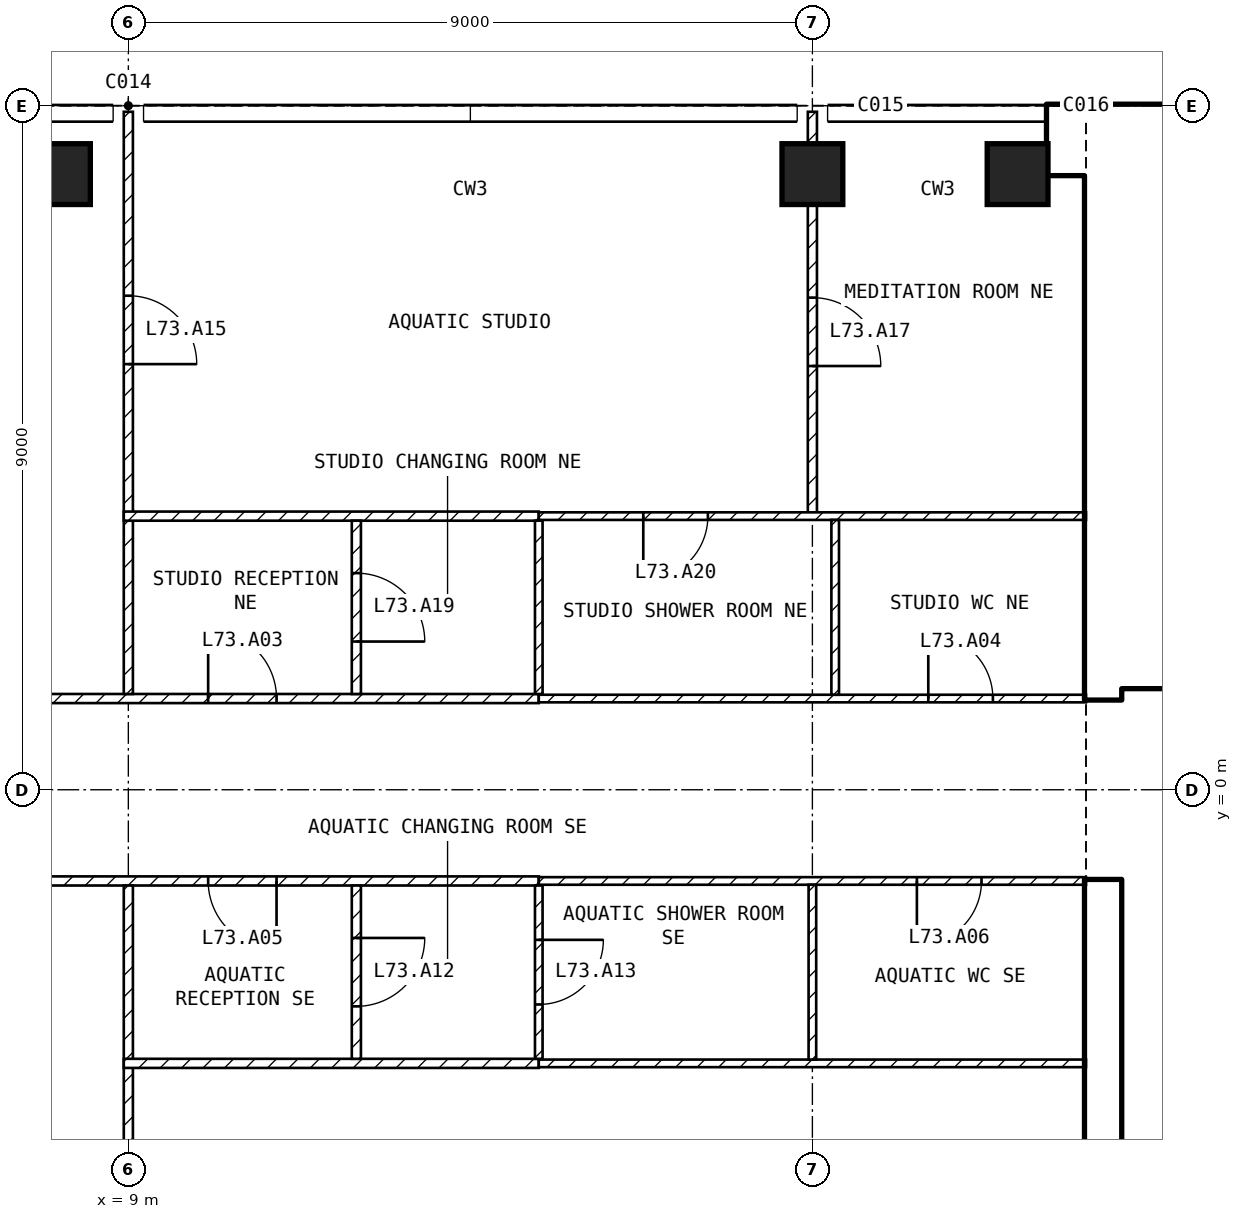
"""IFC4 building model, lengths in metres.
Left out: names, types, materials, properties, quantities, classifications, styles, units other than length and angle.
Written with IfcOpenShell. Run it as: python <this file> out.ifc"""

import sys

from ifc_helpers import new_model, si_unit, direction, frame, frame_2d, origin, origin_2d, place, context, subcontext, project, spatial, rectangle, extrude, element, fill, save


model = new_model("IFC4")
c1 = context("Model", 3, precision=1e-05, world=origin(), true_north=direction((0.0, 1.0)))
c2 = subcontext(c1, "Body", "Model", "MODEL_VIEW")
j1 = project(units=[si_unit("LENGTHUNIT", "METRE"), si_unit("PLANEANGLEUNIT", "RADIAN")], contexts=[c1])
p1 = place(None, origin())
s1 = spatial("IfcSite", under=j1, at=p1, CompositionType="ELEMENT")
p2 = place(p1, origin())
s2 = spatial("IfcBuilding", under=s1, at=p2, CompositionType="ELEMENT")
p3 = place(p2, frame((0.0, 0.0, 285.0)))
s3 = spatial("IfcBuildingStorey", under=s2, at=p3, CompositionType="ELEMENT", Elevation=285.0)
for number, where, z_axis, x_axis in (
    (1, (8.1, 8.1, -0.3), (0.0, 0.0, 1.0), (1.0, 0.0, 0.0)),
    (2, (18.0, 8.1, -0.3), (0.0, 0.0, 1.0), (1.0, 0.0, 0.0)),
    (3, (20.7, 8.1, -0.3), (0.0, 0.0, 1.0), (1.0, 0.0, 0.0)),
):
    element("IfcColumn", number, at=place(p3, frame(where, z_axis=z_axis, x_axis=x_axis)), inside=s3, PredefinedType="COLUMN", context=c2, shape_type="SweptSolid", body=[
        extrude(rectangle(XDim=0.8, YDim=0.8, at=origin_2d()), origin(), (0.0, 0.0, 1.0), 5.45),
    ])
p4 = place(p3, frame((21.1, 8.55, 0.0), z_axis=(0.0, 0.0, 1.0), x_axis=(1.0, 0.0, 0.0)))
e4 = element("IfcWall", 4, at=p4, inside=s3, PredefinedType="SHEAR", context=c2, shape_type="SweptSolid", body=[
    extrude(rectangle(XDim=8.65, YDim=0.9, at=frame_2d((4.325, 0.0))), origin(), (0.0, 0.0, 1.0), 5.15),
])
for number, where, z_axis, x_axis in (
    (5, (21.825, -8.1, 0.0), (0.0, 0.0, 1.0), (0.0, 1.0, 0.0)),
    (6, (21.825, 1.2, 0.0), (0.0, 0.0, 1.0), (0.0, 1.0, 0.0)),
):
    element("IfcWall", number, at=place(p3, frame(where, z_axis=z_axis, x_axis=x_axis)), inside=s3, PredefinedType="SHEAR", context=c2, shape_type="SweptSolid", body=[
        extrude(rectangle(XDim=6.9, YDim=0.45, at=frame_2d((3.45, 0.0))), origin(), (0.0, 0.0, 1.0), 5.15),
    ])
p5 = place(p3, frame((22.05, 1.45, 0.0), z_axis=(0.0, 0.0, 1.0), x_axis=(1.0, 0.0, 0.0)))
e7 = element("IfcWall", 7, at=p5, inside=s3, PredefinedType="SOLIDWALL", context=c2, shape_type="SweptSolid", body=[
    extrude(rectangle(XDim=11.3, YDim=0.2, at=frame_2d((5.65, 0.0))), origin(), (0.0, 0.0, 1.0), 5.15),
])
p6 = place(p5, frame((0.75, 0.0, 0.0)))
e8 = element("IfcOpeningElement", 8, at=p6, cuts=e7, PredefinedType="OPENING", context=c2, shape_type="SweptSolid", body=[
    extrude(rectangle(XDim=1.0, YDim=2.1, at=frame_2d((0.5, 1.05))), frame((0.0, 0.11, 0.0), z_axis=(0.0, -1.0, 0.0), x_axis=(1.0, 0.0, 0.0)), (0.0, 0.0, 1.0), 0.22),
])
p7 = place(p5, frame((3.25, 0.0, 0.0)))
e9 = element("IfcOpeningElement", 9, at=p7, cuts=e7, PredefinedType="OPENING", context=c2, shape_type="SweptSolid", body=[
    extrude(rectangle(XDim=1.0, YDim=2.1, at=frame_2d((0.5, 1.05))), frame((0.0, 0.11, 0.0), z_axis=(0.0, -1.0, 0.0), x_axis=(1.0, 0.0, 0.0)), (0.0, 0.0, 1.0), 0.22),
])
p8 = place(p5, frame((9.225, 0.0, 0.0)))
e10 = element("IfcOpeningElement", 10, at=p8, cuts=e7, PredefinedType="OPENING", context=c2, shape_type="SweptSolid", body=[
    extrude(rectangle(XDim=0.9, YDim=2.1, at=frame_2d((0.45, 1.05))), frame((0.0, 0.11, 0.0), z_axis=(0.0, -1.0, 0.0), x_axis=(1.0, 0.0, 0.0)), (0.0, 0.0, 1.0), 0.22),
])
p9 = place(p3, frame((22.05, 5.15, 0.0), z_axis=(0.0, 0.0, 1.0), x_axis=(1.0, 0.0, 0.0)))
e11 = element("IfcWall", 11, at=p9, inside=s3, PredefinedType="SOLIDWALL", context=c2, shape_type="SweptSolid", body=[
    extrude(rectangle(XDim=6.3, YDim=0.2, at=frame_2d((3.15, 0.0))), origin(), (0.0, 0.0, 1.0), 5.15),
])
p10 = place(p9, frame((0.2, 0.0, 0.0)))
e12 = element("IfcOpeningElement", 12, at=p10, cuts=e11, PredefinedType="OPENING", context=c2, shape_type="SweptSolid", body=[
    extrude(rectangle(XDim=1.0, YDim=2.1, at=frame_2d((0.5, 1.05))), frame((0.0, 0.11, 0.0), z_axis=(0.0, -1.0, 0.0), x_axis=(1.0, 0.0, 0.0)), (0.0, 0.0, 1.0), 0.22),
])
p11 = place(p3, frame((-18.3, 1.2, 0.0), z_axis=(0.0, 0.0, 1.0), x_axis=(1.0, 0.0, 0.0)))
e13 = element("IfcWall", 13, at=p11, inside=s3, PredefinedType="PARTITIONING", context=c2, shape_type="SweptSolid", body=[
    extrude(rectangle(XDim=32.7, YDim=0.12, at=frame_2d((16.35, 0.0))), origin(), (0.0, 0.0, 1.0), 5.15),
])
p12 = place(p11, frame((17.4, 0.0, 0.0)))
e14 = element("IfcOpeningElement", 14, at=p12, cuts=e13, PredefinedType="OPENING", context=c2, shape_type="SweptSolid", body=[
    extrude(rectangle(XDim=1.8, YDim=2.1, at=frame_2d((0.9, 1.05))), frame((0.0, 0.07, 0.0), z_axis=(0.0, -1.0, 0.0), x_axis=(1.0, 0.0, 0.0)), (0.0, 0.0, 1.0), 0.14),
])
p13 = place(p11, frame((28.35, 0.0, 0.0)))
e15 = element("IfcOpeningElement", 15, at=p13, cuts=e13, PredefinedType="OPENING", context=c2, shape_type="SweptSolid", body=[
    extrude(rectangle(XDim=0.9, YDim=2.1, at=frame_2d((0.45, 1.05))), frame((0.0, 0.07, 0.0), z_axis=(0.0, -1.0, 0.0), x_axis=(1.0, 0.0, 0.0)), (0.0, 0.0, 1.0), 0.14),
])
p14 = place(p11, frame((6.9, 0.0, 0.0)))
e16 = element("IfcOpeningElement", 16, at=p14, cuts=e13, PredefinedType="OPENING", context=c2, shape_type="SweptSolid", body=[
    extrude(rectangle(XDim=0.9, YDim=2.1, at=frame_2d((0.45, 1.05))), frame((0.0, 0.07, 0.0), z_axis=(0.0, -1.0, 0.0), x_axis=(1.0, 0.0, 0.0)), (0.0, 0.0, 1.0), 0.14),
])
p15 = place(p3, frame((14.4, -1.2, 0.0), z_axis=(0.0, 0.0, 1.0), x_axis=(-1.0, 0.0, 0.0)))
e17 = element("IfcWall", 17, at=p15, inside=s3, PredefinedType="PARTITIONING", context=c2, shape_type="SweptSolid", body=[
    extrude(rectangle(XDim=32.4, YDim=0.12, at=frame_2d((16.2, 0.0))), origin(), (0.0, 0.0, 1.0), 5.15),
])
p16 = place(p15, frame((13.5, 0.0, 0.0)))
e18 = element("IfcOpeningElement", 18, at=p16, cuts=e17, PredefinedType="OPENING", context=c2, shape_type="SweptSolid", body=[
    extrude(rectangle(XDim=1.8, YDim=2.1, at=frame_2d((0.9, 1.05))), frame((0.0, 0.07, 0.0), z_axis=(0.0, -1.0, 0.0), x_axis=(1.0, 0.0, 0.0)), (0.0, 0.0, 1.0), 0.14),
])
p17 = place(p15, frame((3.45, 0.0, 0.0)))
e19 = element("IfcOpeningElement", 19, at=p17, cuts=e17, PredefinedType="OPENING", context=c2, shape_type="SweptSolid", body=[
    extrude(rectangle(XDim=0.9, YDim=2.1, at=frame_2d((0.45, 1.05))), frame((0.0, 0.07, 0.0), z_axis=(0.0, -1.0, 0.0), x_axis=(1.0, 0.0, 0.0)), (0.0, 0.0, 1.0), 0.14),
])
p18 = place(p15, frame((30.15, 0.0, 0.0)))
e20 = element("IfcOpeningElement", 20, at=p18, cuts=e17, PredefinedType="OPENING", context=c2, shape_type="SweptSolid", body=[
    extrude(rectangle(XDim=0.9, YDim=2.1, at=frame_2d((0.45, 1.05))), frame((0.0, 0.07, 0.0), z_axis=(0.0, -1.0, 0.0), x_axis=(1.0, 0.0, 0.0)), (0.0, 0.0, 1.0), 0.14),
])
p19 = place(p3, frame((14.4, 1.2, 0.0), z_axis=(0.0, 0.0, 1.0), x_axis=(1.0, 0.0, 0.0)))
e21 = element("IfcWall", 21, at=p19, inside=s3, PredefinedType="PARTITIONING", context=c2, shape_type="SweptSolid", body=[
    extrude(rectangle(XDim=7.2, YDim=0.1, at=frame_2d((3.6, 0.0))), origin(), (0.0, 0.0, 1.0), 5.15),
])
p20 = place(p19, frame((5.125, 0.0, 0.0)))
e22 = element("IfcOpeningElement", 22, at=p20, cuts=e21, PredefinedType="OPENING", context=c2, shape_type="SweptSolid", body=[
    extrude(rectangle(XDim=0.85, YDim=2.1, at=frame_2d((0.425, 1.05))), frame((0.0, 0.06, 0.0), z_axis=(0.0, -1.0, 0.0), x_axis=(1.0, 0.0, 0.0)), (0.0, 0.0, 1.0), 0.12),
])
p21 = place(p3, frame((21.6, -1.2, 0.0), z_axis=(0.0, 0.0, 1.0), x_axis=(-1.0, 0.0, 0.0)))
e23 = element("IfcWall", 23, at=p21, inside=s3, PredefinedType="PARTITIONING", context=c2, shape_type="SweptSolid", body=[
    extrude(rectangle(XDim=7.2, YDim=0.1, at=frame_2d((3.6, 0.0))), origin(), (0.0, 0.0, 1.0), 5.15),
])
p22 = place(p21, frame((1.375, 0.0, 0.0)))
e24 = element("IfcOpeningElement", 24, at=p22, cuts=e23, PredefinedType="OPENING", context=c2, shape_type="SweptSolid", body=[
    extrude(rectangle(XDim=0.85, YDim=2.1, at=frame_2d((0.425, 1.05))), frame((0.0, 0.06, 0.0), z_axis=(0.0, -1.0, 0.0), x_axis=(1.0, 0.0, 0.0)), (0.0, 0.0, 1.0), 0.12),
])
p23 = place(p3, frame((9.0, 8.92, 0.0), z_axis=(0.0, 0.0, 1.0), x_axis=(0.0, -1.0, 0.0)))
e25 = element("IfcWall", 25, at=p23, inside=s3, PredefinedType="PARTITIONING", context=c2, shape_type="SweptSolid", body=[
    extrude(rectangle(XDim=7.66, YDim=0.12, at=frame_2d((3.83, 0.0))), origin(), (0.0, 0.0, 1.0), 5.15),
])
p24 = place(p23, frame((2.42, 0.0, 0.0)))
e26 = element("IfcOpeningElement", 26, at=p24, cuts=e25, PredefinedType="OPENING", context=c2, shape_type="SweptSolid", body=[
    extrude(rectangle(XDim=0.9, YDim=2.1, at=frame_2d((0.45, 1.05))), frame((0.0, 0.07, 0.0), z_axis=(0.0, -1.0, 0.0), x_axis=(1.0, 0.0, 0.0)), (0.0, 0.0, 1.0), 0.14),
])
p25 = place(p3, frame((9.0, -1.26, 0.0), z_axis=(0.0, 0.0, 1.0), x_axis=(0.0, -1.0, 0.0)))
e27 = element("IfcWall", 27, at=p25, inside=s3, PredefinedType="PARTITIONING", context=c2, shape_type="SweptSolid", body=[
    extrude(rectangle(XDim=7.66, YDim=0.12, at=frame_2d((3.83, 0.0))), origin(), (0.0, 0.0, 1.0), 5.15),
])
p26 = place(p25, frame((4.44, 0.0, 0.0)))
e28 = element("IfcOpeningElement", 28, at=p26, cuts=e27, PredefinedType="OPENING", context=c2, shape_type="SweptSolid", body=[
    extrude(rectangle(XDim=0.9, YDim=2.1, at=frame_2d((0.45, 1.05))), frame((0.0, 0.07, 0.0), z_axis=(0.0, -1.0, 0.0), x_axis=(1.0, 0.0, 0.0)), (0.0, 0.0, 1.0), 0.14),
])
p27 = place(p3, frame((18.0, 8.92, 0.0), z_axis=(0.0, 0.0, 1.0), x_axis=(0.0, -1.0, 0.0)))
e29 = element("IfcWall", 29, at=p27, inside=s3, PredefinedType="PARTITIONING", context=c2, shape_type="SweptSolid", body=[
    extrude(rectangle(XDim=5.27, YDim=0.12, at=frame_2d((2.635, 0.0))), origin(), (0.0, 0.0, 1.0), 4.396),
])
p28 = place(p27, frame((2.445, 0.0, 0.0)))
e30 = element("IfcOpeningElement", 30, at=p28, cuts=e29, PredefinedType="OPENING", context=c2, shape_type="SweptSolid", body=[
    extrude(rectangle(XDim=0.9, YDim=2.1, at=frame_2d((0.45, 1.05))), frame((0.0, 0.07, 0.0), z_axis=(0.0, -1.0, 0.0), x_axis=(1.0, 0.0, 0.0)), (0.0, 0.0, 1.0), 0.14),
])
p29 = place(p3, frame((14.4, 3.6, 0.0), z_axis=(0.0, 0.0, 1.0), x_axis=(-1.0, 0.0, 0.0)))
e31 = element("IfcWall", 31, at=p29, inside=s3, PredefinedType="PARTITIONING", context=c2, shape_type="SweptSolid", body=[
    extrude(rectangle(XDim=5.46, YDim=0.12, at=frame_2d((2.73, 0.0))), origin(), (0.0, 0.0, 1.0), 5.15),
])
p30 = place(p3, frame((21.6, 3.6, 0.0), z_axis=(0.0, 0.0, 1.0), x_axis=(-1.0, 0.0, 0.0)))
e32 = element("IfcWall", 32, at=p30, inside=s3, PredefinedType="PARTITIONING", context=c2, shape_type="SweptSolid", body=[
    extrude(rectangle(XDim=7.2, YDim=0.1, at=frame_2d((3.6, 0.0))), origin(), (0.0, 0.0, 1.0), 5.15),
])
p31 = place(p30, frame((4.975, 0.0, 0.0)))
e33 = element("IfcOpeningElement", 33, at=p31, cuts=e32, PredefinedType="OPENING", context=c2, shape_type="SweptSolid", body=[
    extrude(rectangle(XDim=0.85, YDim=2.1, at=frame_2d((0.425, 1.05))), frame((0.0, 0.06, 0.0), z_axis=(0.0, -1.0, 0.0), x_axis=(1.0, 0.0, 0.0)), (0.0, 0.0, 1.0), 0.12),
])
p32 = place(p3, frame((12.0, 3.54, 0.0), z_axis=(0.0, 0.0, 1.0), x_axis=(0.0, -1.0, 0.0)))
e34 = element("IfcWall", 34, at=p32, inside=s3, PredefinedType="PARTITIONING", context=c2, shape_type="SweptSolid", body=[
    extrude(rectangle(XDim=2.28, YDim=0.12, at=frame_2d((1.14, 0.0))), origin(), (0.0, 0.0, 1.0), 5.15),
])
p33 = place(p32, frame((0.69, 0.0, 0.0)))
e35 = element("IfcOpeningElement", 35, at=p33, cuts=e34, PredefinedType="OPENING", context=c2, shape_type="SweptSolid", body=[
    extrude(rectangle(XDim=0.9, YDim=2.1, at=frame_2d((0.45, 1.05))), frame((0.0, 0.07, 0.0), z_axis=(0.0, -1.0, 0.0), x_axis=(1.0, 0.0, 0.0)), (0.0, 0.0, 1.0), 0.14),
])
p34 = place(p3, frame((14.4, 3.54, 0.0), z_axis=(0.0, 0.0, 1.0), x_axis=(0.0, -1.0, 0.0)))
e36 = element("IfcWall", 36, at=p34, inside=s3, PredefinedType="PARTITIONING", context=c2, shape_type="SweptSolid", body=[
    extrude(rectangle(XDim=2.28, YDim=0.1, at=frame_2d((1.14, 0.0))), origin(), (0.0, 0.0, 1.0), 5.15),
])
p35 = place(p3, frame((18.3, 3.55, 0.0), z_axis=(0.0, 0.0, 1.0), x_axis=(0.0, -1.0, 0.0)))
e37 = element("IfcWall", 37, at=p35, inside=s3, PredefinedType="PARTITIONING", context=c2, shape_type="SweptSolid", body=[
    extrude(rectangle(XDim=2.3, YDim=0.1, at=frame_2d((1.15, 0.0))), origin(), (0.0, 0.0, 1.0), 5.15),
])
p36 = place(p3, frame((8.94, -3.6, 0.0), z_axis=(0.0, 0.0, 1.0), x_axis=(1.0, 0.0, 0.0)))
e38 = element("IfcWall", 38, at=p36, inside=s3, PredefinedType="PARTITIONING", context=c2, shape_type="SweptSolid", body=[
    extrude(rectangle(XDim=5.46, YDim=0.12, at=frame_2d((2.73, 0.0))), origin(), (0.0, 0.0, 1.0), 5.15),
])
p37 = place(p3, frame((14.4, -3.6, 0.0), z_axis=(0.0, 0.0, 1.0), x_axis=(1.0, 0.0, 0.0)))
e39 = element("IfcWall", 39, at=p37, inside=s3, PredefinedType="PARTITIONING", context=c2, shape_type="SweptSolid", body=[
    extrude(rectangle(XDim=7.2, YDim=0.1, at=frame_2d((3.6, 0.0))), origin(), (0.0, 0.0, 1.0), 5.15),
])
p38 = place(p3, frame((12.0, -1.26, 0.0), z_axis=(0.0, 0.0, 1.0), x_axis=(0.0, -1.0, 0.0)))
e40 = element("IfcWall", 40, at=p38, inside=s3, PredefinedType="PARTITIONING", context=c2, shape_type="SweptSolid", body=[
    extrude(rectangle(XDim=2.28, YDim=0.12, at=frame_2d((1.14, 0.0))), origin(), (0.0, 0.0, 1.0), 5.15),
])
p39 = place(p38, frame((0.69, 0.0, 0.0)))
e41 = element("IfcOpeningElement", 41, at=p39, cuts=e40, PredefinedType="OPENING", context=c2, shape_type="SweptSolid", body=[
    extrude(rectangle(XDim=0.9, YDim=2.1, at=frame_2d((0.45, 1.05))), frame((0.0, 0.07, 0.0), z_axis=(0.0, -1.0, 0.0), x_axis=(1.0, 0.0, 0.0)), (0.0, 0.0, 1.0), 0.14),
])
p40 = place(p3, frame((14.4, -1.26, 0.0), z_axis=(0.0, 0.0, 1.0), x_axis=(0.0, -1.0, 0.0)))
e42 = element("IfcWall", 42, at=p40, inside=s3, PredefinedType="PARTITIONING", context=c2, shape_type="SweptSolid", body=[
    extrude(rectangle(XDim=2.28, YDim=0.1, at=frame_2d((1.14, 0.0))), origin(), (0.0, 0.0, 1.0), 5.15),
])
p41 = place(p40, frame((0.715, 0.0, 0.0)))
e43 = element("IfcOpeningElement", 43, at=p41, cuts=e42, PredefinedType="OPENING", context=c2, shape_type="SweptSolid", body=[
    extrude(rectangle(XDim=0.85, YDim=2.1, at=frame_2d((0.425, 1.05))), frame((0.0, 0.06, 0.0), z_axis=(0.0, -1.0, 0.0), x_axis=(1.0, 0.0, 0.0)), (0.0, 0.0, 1.0), 0.12),
])
p42 = place(p3, frame((18.0, -1.25, 0.0), z_axis=(0.0, 0.0, 1.0), x_axis=(0.0, -1.0, 0.0)))
e44 = element("IfcWall", 44, at=p42, inside=s3, PredefinedType="PARTITIONING", context=c2, shape_type="SweptSolid", body=[
    extrude(rectangle(XDim=2.3, YDim=0.1, at=frame_2d((1.15, 0.0))), origin(), (0.0, 0.0, 1.0), 4.396),
])
p43 = place(p10, origin())
e45 = element("IfcDoor", 45, at=p43, inside=s3, OperationType="SINGLE_SWING_LEFT", PredefinedType="DOOR", context=c2, shape_type="SweptSolid", body=[
    extrude(rectangle(XDim=1.0, YDim=2.1, at=frame_2d((0.5, 1.05))), frame((0.0, 0.025, 0.0), z_axis=(0.0, -1.0, 0.0), x_axis=(1.0, 0.0, 0.0)), (0.0, 0.0, 1.0), 0.05),
])
fill(e12, e45)
p44 = place(p13, origin())
e46 = element("IfcDoor", 46, at=p44, inside=s3, OperationType="SINGLE_SWING_LEFT", PredefinedType="DOOR", context=c2, shape_type="SweptSolid", body=[
    extrude(rectangle(XDim=0.9, YDim=2.1, at=frame_2d((0.45, 1.05))), frame((0.0, 0.025, 0.0), z_axis=(0.0, -1.0, 0.0), x_axis=(1.0, 0.0, 0.0)), (0.0, 0.0, 1.0), 0.05),
])
fill(e15, e46)
p45 = place(p20, origin())
e47 = element("IfcDoor", 47, at=p45, inside=s3, OperationType="SINGLE_SWING_LEFT", PredefinedType="DOOR", context=c2, shape_type="SweptSolid", body=[
    extrude(rectangle(XDim=0.85, YDim=2.1, at=frame_2d((0.425, 1.05))), frame((0.0, 0.025, 0.0), z_axis=(0.0, -1.0, 0.0), x_axis=(1.0, 0.0, 0.0)), (0.0, 0.0, 1.0), 0.05),
])
fill(e22, e47)
p46 = place(p17, origin())
e48 = element("IfcDoor", 48, at=p46, inside=s3, OperationType="SINGLE_SWING_LEFT", PredefinedType="DOOR", context=c2, shape_type="SweptSolid", body=[
    extrude(rectangle(XDim=0.9, YDim=2.1, at=frame_2d((0.45, 1.05))), frame((0.0, 0.025, 0.0), z_axis=(0.0, -1.0, 0.0), x_axis=(1.0, 0.0, 0.0)), (0.0, 0.0, 1.0), 0.05),
])
fill(e19, e48)
p47 = place(p22, origin())
e49 = element("IfcDoor", 49, at=p47, inside=s3, OperationType="SINGLE_SWING_RIGHT", PredefinedType="DOOR", context=c2, shape_type="SweptSolid", body=[
    extrude(rectangle(XDim=0.85, YDim=2.1, at=frame_2d((0.425, 1.05))), frame((0.0, 0.025, 0.0), z_axis=(0.0, -1.0, 0.0), x_axis=(1.0, 0.0, 0.0)), (0.0, 0.0, 1.0), 0.05),
])
fill(e24, e49)
p48 = place(p39, origin())
e50 = element("IfcDoor", 50, at=p48, inside=s3, OperationType="SINGLE_SWING_LEFT", PredefinedType="DOOR", context=c2, shape_type="SweptSolid", body=[
    extrude(rectangle(XDim=0.9, YDim=2.1, at=frame_2d((0.45, 1.05))), frame((0.0, 0.025, 0.0), z_axis=(0.0, -1.0, 0.0), x_axis=(1.0, 0.0, 0.0)), (0.0, 0.0, 1.0), 0.05),
])
fill(e41, e50)
p49 = place(p41, origin())
e51 = element("IfcDoor", 51, at=p49, inside=s3, OperationType="SINGLE_SWING_LEFT", PredefinedType="DOOR", context=c2, shape_type="SweptSolid", body=[
    extrude(rectangle(XDim=0.85, YDim=2.1, at=frame_2d((0.425, 1.05))), frame((0.0, 0.025, 0.0), z_axis=(0.0, -1.0, 0.0), x_axis=(1.0, 0.0, 0.0)), (0.0, 0.0, 1.0), 0.05),
])
fill(e43, e51)
p50 = place(p24, origin())
e52 = element("IfcDoor", 52, at=p50, inside=s3, OperationType="SINGLE_SWING_RIGHT", PredefinedType="DOOR", context=c2, shape_type="SweptSolid", body=[
    extrude(rectangle(XDim=0.9, YDim=2.1, at=frame_2d((0.45, 1.05))), frame((0.0, 0.025, 0.0), z_axis=(0.0, -1.0, 0.0), x_axis=(1.0, 0.0, 0.0)), (0.0, 0.0, 1.0), 0.05),
])
fill(e26, e52)
p51 = place(p28, origin())
e53 = element("IfcDoor", 53, at=p51, inside=s3, OperationType="SINGLE_SWING_RIGHT", PredefinedType="DOOR", context=c2, shape_type="SweptSolid", body=[
    extrude(rectangle(XDim=0.9, YDim=2.1, at=frame_2d((0.45, 1.05))), frame((0.0, 0.025, 0.0), z_axis=(0.0, -1.0, 0.0), x_axis=(1.0, 0.0, 0.0)), (0.0, 0.0, 1.0), 0.05),
])
fill(e30, e53)
p52 = place(p33, origin())
e54 = element("IfcDoor", 54, at=p52, inside=s3, OperationType="SINGLE_SWING_RIGHT", PredefinedType="DOOR", context=c2, shape_type="SweptSolid", body=[
    extrude(rectangle(XDim=0.9, YDim=2.1, at=frame_2d((0.45, 1.05))), frame((0.0, 0.025, 0.0), z_axis=(0.0, -1.0, 0.0), x_axis=(1.0, 0.0, 0.0)), (0.0, 0.0, 1.0), 0.05),
])
fill(e35, e54)
p53 = place(p31, origin())
e55 = element("IfcDoor", 55, at=p53, inside=s3, OperationType="SINGLE_SWING_RIGHT", PredefinedType="DOOR", context=c2, shape_type="SweptSolid", body=[
    extrude(rectangle(XDim=0.85, YDim=2.1, at=frame_2d((0.425, 1.05))), frame((0.0, 0.025, 0.0), z_axis=(0.0, -1.0, 0.0), x_axis=(1.0, 0.0, 0.0)), (0.0, 0.0, 1.0), 0.05),
])
fill(e33, e55)
save(model, sys.argv[1])
